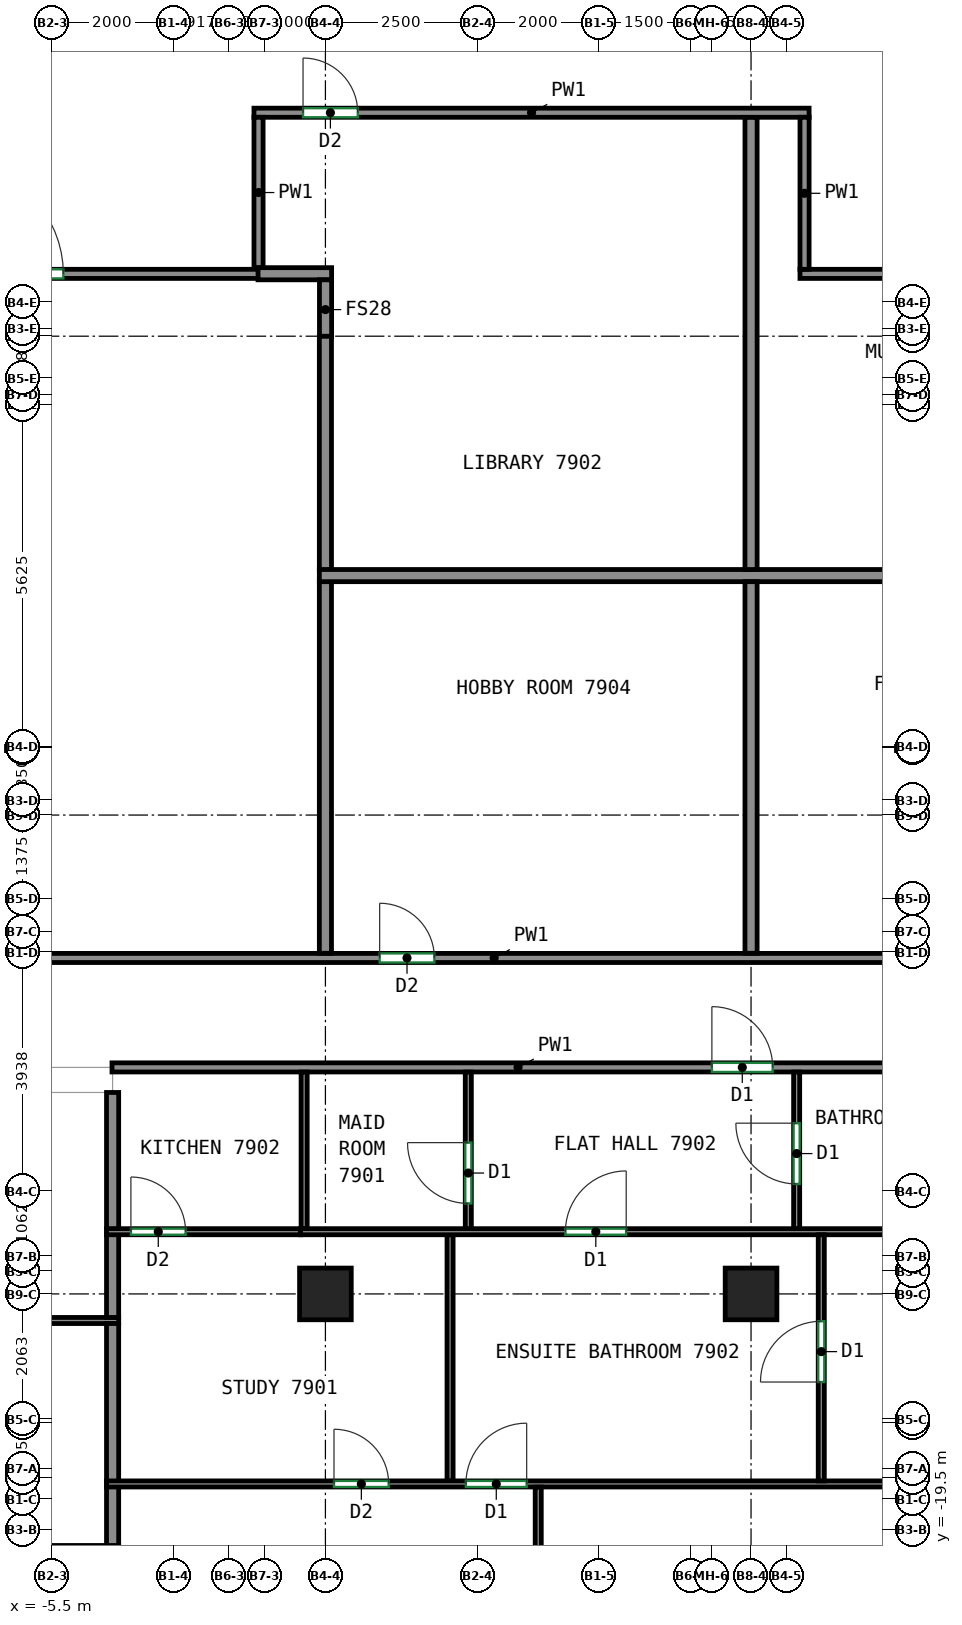
"""IFC4 building model, lengths in metres.
Left out: names, types, materials, properties, quantities, classifications, styles, units other than length and angle.
Written with IfcOpenShell. Run it as: python <this file> out.ifc"""

import sys

from ifc_helpers import new_model, si_unit, direction, frame, frame_2d, origin, origin_2d, place, context, subcontext, project, spatial, rectangle, extrude, source, transform, mapped, element, fill, save


model = new_model("IFC4")
c1 = context("Model", 3, precision=1e-05, world=origin(), true_north=direction((0.0, 1.0)))
c2 = subcontext(c1, "Body", "Model", "MODEL_VIEW")
j1 = project(units=[si_unit("LENGTHUNIT", "METRE"), si_unit("PLANEANGLEUNIT", "RADIAN")], contexts=[c1])
p1 = place(None, origin())
s1 = spatial("IfcSite", under=j1, at=p1, CompositionType="ELEMENT")
p2 = place(p1, origin())
s2 = spatial("IfcBuilding", under=s1, at=p2, CompositionType="ELEMENT")
p3 = place(p2, frame((0.0, 0.0, 315.4)))
s3 = spatial("IfcBuildingStorey", under=s2, at=p3, CompositionType="ELEMENT", Elevation=315.4)
m1 = source(origin(), c2, "Body", "SweptSolid", [
    extrude(rectangle(XDim=0.85, YDim=0.85, at=origin_2d()), origin(), (0.0, 0.0, 1.0), 3.0),
])
for number, where, z_axis, x_axis in (
    (1, (-1.0, -15.625, 0.0), (0.0, 0.0, 1.0), (1.0, 0.0, 0.0)),
    (2, (6.0, -15.625, 0.0), (0.0, 0.0, 1.0), (1.0, 0.0, 0.0)),
):
    element("IfcColumn", number, at=place(p3, frame(where, z_axis=z_axis, x_axis=x_axis)), inside=s3, PredefinedType="COLUMN", context=c2, shape_type="MappedRepresentation", body=[
        mapped(m1, transform((0.0, 0.0, 0.0))),
    ])
p4 = place(p3, frame((-4.51, -11.9, 0.0), z_axis=(0.0, 0.0, 1.0), x_axis=(1.0, 0.0, 0.0)))
e3 = element("IfcWall", 3, at=p4, inside=s3, PredefinedType="PARTITIONING", context=c2, shape_type="SweptSolid", body=[
    extrude(rectangle(XDim=22.26, YDim=0.15, at=frame_2d((11.13, 0.0))), origin(), (0.0, 0.0, 1.0), 3.0),
])
p5 = place(p4, frame((9.866, 0.0, 0.0)))
e4 = element("IfcOpeningElement", 4, at=p5, cuts=e3, PredefinedType="OPENING", context=c2, shape_type="SweptSolid", body=[
    extrude(rectangle(XDim=1.0, YDim=2.1, at=frame_2d((0.5, 1.05))), frame((0.0, 0.085, 0.0), z_axis=(0.0, -1.0, 0.0), x_axis=(1.0, 0.0, 0.0)), (0.0, 0.0, 1.0), 0.17),
])
p6 = place(p3, frame((-14.935, 1.15, 0.0), z_axis=(0.0, 0.0, 1.0), x_axis=(1.0, 0.0, 0.0)))
e5 = element("IfcWall", 5, at=p6, inside=s3, PredefinedType="PARTITIONING", context=c2, shape_type="SweptSolid", body=[
    extrude(rectangle(XDim=12.835, YDim=0.15, at=frame_2d((6.417, 0.0))), origin(), (0.0, 0.0, 1.0), 3.0),
])
p7 = place(p6, frame((7.825, 0.0, 0.0)))
e6 = element("IfcOpeningElement", 6, at=p7, cuts=e5, PredefinedType="OPENING", context=c2, shape_type="SweptSolid", body=[
    extrude(rectangle(XDim=1.8, YDim=2.1, at=frame_2d((0.9, 1.05))), frame((0.0, 0.085, 0.0), z_axis=(0.0, -1.0, 0.0), x_axis=(1.0, 0.0, 0.0)), (0.0, 0.0, 1.0), 0.17),
])
p8 = place(p3, frame((-13.55, -10.1, 0.0), z_axis=(0.0, 0.0, 1.0), x_axis=(1.0, 0.0, 0.0)))
e7 = element("IfcWall", 7, at=p8, inside=s3, PredefinedType="PARTITIONING", context=c2, shape_type="SweptSolid", body=[
    extrude(rectangle(XDim=30.65, YDim=0.15, at=frame_2d((15.325, 0.0))), origin(), (0.0, 0.0, 1.0), 3.0),
])
p9 = place(p8, frame((13.442, 0.0, 0.0)))
e8 = element("IfcOpeningElement", 8, at=p9, cuts=e7, PredefinedType="OPENING", context=c2, shape_type="SweptSolid", body=[
    extrude(rectangle(XDim=0.9, YDim=2.1, at=frame_2d((0.45, 1.05))), frame((0.0, 0.085, 0.0), z_axis=(0.0, -1.0, 0.0), x_axis=(1.0, 0.0, 0.0)), (0.0, 0.0, 1.0), 0.17),
])
p10 = place(p8, frame((25.452, 0.0, 0.0)))
e9 = element("IfcOpeningElement", 9, at=p10, cuts=e7, PredefinedType="OPENING", context=c2, shape_type="SweptSolid", body=[
    extrude(rectangle(XDim=0.9, YDim=2.1, at=frame_2d((0.45, 1.05))), frame((0.0, 0.085, 0.0), z_axis=(0.0, -1.0, 0.0), x_axis=(1.0, 0.0, 0.0)), (0.0, 0.0, 1.0), 0.17),
])
p11 = place(p3, frame((-2.175, 3.8, 0.0), z_axis=(0.0, 0.0, 1.0), x_axis=(1.0, 0.0, 0.0)))
e10 = element("IfcWall", 10, at=p11, inside=s3, PredefinedType="PARTITIONING", context=c2, shape_type="SweptSolid", body=[
    extrude(rectangle(XDim=9.13, YDim=0.15, at=frame_2d((4.565, 0.0))), origin(), (0.0, 0.0, 1.0), 3.0),
])
p12 = place(p11, frame((0.807, 0.0, 0.0)))
e11 = element("IfcOpeningElement", 11, at=p12, cuts=e10, PredefinedType="OPENING", context=c2, shape_type="SweptSolid", body=[
    extrude(rectangle(XDim=0.9, YDim=2.1, at=frame_2d((0.45, 1.05))), frame((0.0, 0.085, 0.0), z_axis=(0.0, -1.0, 0.0), x_axis=(1.0, 0.0, 0.0)), (0.0, 0.0, 1.0), 0.17),
])
p13 = place(p3, frame((-2.1, 1.25, 0.0), z_axis=(0.0, 0.0, 1.0), x_axis=(0.0, 1.0, 0.0)))
e12 = element("IfcWall", 12, at=p13, inside=s3, PredefinedType="PARTITIONING", context=c2, shape_type="SweptSolid", body=[
    extrude(rectangle(XDim=2.475, YDim=0.15, at=frame_2d((1.238, 0.0))), origin(), (0.0, 0.0, 1.0), 3.0),
])
p14 = place(p3, frame((6.805, 1.15, 0.0), z_axis=(0.0, 0.0, 1.0), x_axis=(1.0, 0.0, 0.0)))
e13 = element("IfcWall", 13, at=p14, inside=s3, PredefinedType="PARTITIONING", context=c2, shape_type="SweptSolid", body=[
    extrude(rectangle(XDim=10.55, YDim=0.15, at=frame_2d((5.275, 0.0))), origin(), (0.0, 0.0, 1.0), 3.0),
])
p15 = place(p14, frame((6.704, 0.0, 0.0)))
e14 = element("IfcOpeningElement", 14, at=p15, cuts=e13, PredefinedType="OPENING", context=c2, shape_type="SweptSolid", body=[
    extrude(rectangle(XDim=0.9, YDim=2.1, at=frame_2d((0.45, 1.05))), frame((0.0, 0.085, 0.0), z_axis=(0.0, -1.0, 0.0), x_axis=(1.0, 0.0, 0.0)), (0.0, 0.0, 1.0), 0.17),
])
p16 = place(p3, frame((6.88, 3.725, 0.0), z_axis=(0.0, 0.0, 1.0), x_axis=(0.0, -1.0, 0.0)))
e15 = element("IfcWall", 15, at=p16, inside=s3, PredefinedType="PARTITIONING", context=c2, shape_type="SweptSolid", body=[
    extrude(rectangle(XDim=2.5, YDim=0.15, at=frame_2d((1.25, 0.0))), origin(), (0.0, 0.0, 1.0), 3.0),
])
p17 = place(p3, frame((-7.575, -16.062, 0.0), z_axis=(0.0, 0.0, 1.0), x_axis=(1.0, 0.0, 0.0)))
e16 = element("IfcWall", 16, at=p17, inside=s3, PredefinedType="PARTITIONING", context=c2, shape_type="SweptSolid", body=[
    extrude(rectangle(XDim=3.175, YDim=0.1, at=frame_2d((1.587, 0.0))), origin(), (0.0, 0.0, 1.0), 3.0),
])
p18 = place(p3, frame((-4.5, -18.71, 0.0), z_axis=(0.0, 0.0, 1.0), x_axis=(0.0, 1.0, 0.0)))
e17 = element("IfcWall", 17, at=p18, inside=s3, PredefinedType="PARTITIONING", context=c2, shape_type="SweptSolid", body=[
    extrude(rectangle(XDim=2.598, YDim=0.2, at=frame_2d((1.299, 0.0))), origin(), (0.0, 0.0, 1.0), 3.0),
])
p19 = place(p3, frame((-4.5, -19.762, 0.0), z_axis=(0.0, 0.0, 1.0), x_axis=(0.0, 1.0, 0.0)))
e18 = element("IfcWall", 18, at=p19, inside=s3, PredefinedType="PARTITIONING", context=c2, shape_type="SweptSolid", body=[
    extrude(rectangle(XDim=0.97, YDim=0.2, at=frame_2d((0.485, 0.0))), origin(), (0.0, 0.0, 1.0), 3.0),
])
p20 = place(p3, frame((-4.5, -16.012, 0.0), z_axis=(0.0, 0.0, 1.0), x_axis=(0.0, 1.0, 0.0)))
e19 = element("IfcWall", 19, at=p20, inside=s3, PredefinedType="PARTITIONING", context=c2, shape_type="SweptSolid", body=[
    extrude(rectangle(XDim=1.37, YDim=0.2, at=frame_2d((0.685, 0.0))), origin(), (0.0, 0.0, 1.0), 3.0),
])
p21 = place(p3, frame((-4.5, -14.56, 0.0), z_axis=(0.0, 0.0, 1.0), x_axis=(0.0, 1.0, 0.0)))
e20 = element("IfcWall", 20, at=p21, inside=s3, PredefinedType="PARTITIONING", context=c2, shape_type="SweptSolid", body=[
    extrude(rectangle(XDim=2.248, YDim=0.2, at=frame_2d((1.124, 0.0))), origin(), (0.0, 0.0, 1.0), 3.0),
])
p22 = place(p3, frame((1.05, -18.7, 0.0), z_axis=(0.0, 0.0, 1.0), x_axis=(0.0, 1.0, 0.0)))
e21 = element("IfcWall", 21, at=p22, inside=s3, PredefinedType="PARTITIONING", context=c2, shape_type="SweptSolid", body=[
    extrude(rectangle(XDim=4.048, YDim=0.1, at=frame_2d((2.024, 0.0))), origin(), (0.0, 0.0, 1.0), 3.0),
])
p23 = place(p3, frame((-4.6, -14.602, 0.0), z_axis=(0.0, 0.0, 1.0), x_axis=(1.0, 0.0, 0.0)))
e22 = element("IfcWall", 22, at=p23, inside=s3, PredefinedType="PARTITIONING", context=c2, shape_type="SweptSolid", body=[
    extrude(rectangle(XDim=3.19, YDim=0.1, at=frame_2d((1.595, 0.0))), origin(), (0.0, 0.0, 1.0), 3.0),
])
p24 = place(p23, frame((0.401, 0.0, 0.0)))
e23 = element("IfcOpeningElement", 23, at=p24, cuts=e22, PredefinedType="OPENING", context=c2, shape_type="SweptSolid", body=[
    extrude(rectangle(XDim=0.9, YDim=2.1, at=frame_2d((0.45, 1.05))), frame((0.0, 0.06, 0.0), z_axis=(0.0, -1.0, 0.0), x_axis=(1.0, 0.0, 0.0)), (0.0, 0.0, 1.0), 0.12),
])
p25 = place(p3, frame((-1.41, -14.602, 0.0), z_axis=(0.0, 0.0, 1.0), x_axis=(1.0, 0.0, 0.0)))
e24 = element("IfcWall", 24, at=p25, inside=s3, PredefinedType="PARTITIONING", context=c2, shape_type="SweptSolid", body=[
    extrude(rectangle(XDim=19.16, YDim=0.1, at=frame_2d((9.58, 0.0))), origin(), (0.0, 0.0, 1.0), 3.0),
])
p26 = place(p25, frame((4.357, 0.0, 0.0)))
e25 = element("IfcOpeningElement", 25, at=p26, cuts=e24, PredefinedType="OPENING", context=c2, shape_type="SweptSolid", body=[
    extrude(rectangle(XDim=1.0, YDim=2.1, at=frame_2d((0.5, 1.05))), frame((0.0, 0.06, 0.0), z_axis=(0.0, -1.0, 0.0), x_axis=(1.0, 0.0, 0.0)), (0.0, 0.0, 1.0), 0.12),
])
p27 = place(p25, frame((11.804, 0.0, 0.0)))
e26 = element("IfcOpeningElement", 26, at=p27, cuts=e24, PredefinedType="OPENING", context=c2, shape_type="SweptSolid", body=[
    extrude(rectangle(XDim=0.9, YDim=2.1, at=frame_2d((0.45, 1.05))), frame((0.0, 0.06, 0.0), z_axis=(0.0, -1.0, 0.0), x_axis=(1.0, 0.0, 0.0)), (0.0, 0.0, 1.0), 0.12),
])
p28 = place(p25, frame((14.91, 0.0, 0.0)))
e27 = element("IfcOpeningElement", 27, at=p28, cuts=e24, PredefinedType="OPENING", context=c2, shape_type="SweptSolid", body=[
    extrude(rectangle(XDim=0.9, YDim=2.1, at=frame_2d((0.45, 1.05))), frame((0.0, 0.06, 0.0), z_axis=(0.0, -1.0, 0.0), x_axis=(1.0, 0.0, 0.0)), (0.0, 0.0, 1.0), 0.12),
])
p29 = place(p3, frame((-4.6, -18.75, 0.0), z_axis=(0.0, 0.0, 1.0), x_axis=(1.0, 0.0, 0.0)))
e28 = element("IfcWall", 28, at=p29, inside=s3, PredefinedType="PARTITIONING", context=c2, shape_type="SweptSolid", body=[
    extrude(rectangle(XDim=27.85, YDim=0.1, at=frame_2d((13.925, 0.0))), origin(), (0.0, 0.0, 1.0), 3.0),
])
p30 = place(p29, frame((3.741, 0.0, 0.0)))
e29 = element("IfcOpeningElement", 29, at=p30, cuts=e28, PredefinedType="OPENING", context=c2, shape_type="SweptSolid", body=[
    extrude(rectangle(XDim=0.9, YDim=2.1, at=frame_2d((0.45, 1.05))), frame((0.0, 0.06, 0.0), z_axis=(0.0, -1.0, 0.0), x_axis=(1.0, 0.0, 0.0)), (0.0, 0.0, 1.0), 0.12),
])
p31 = place(p29, frame((5.91, 0.0, 0.0)))
e30 = element("IfcOpeningElement", 30, at=p31, cuts=e28, PredefinedType="OPENING", context=c2, shape_type="SweptSolid", body=[
    extrude(rectangle(XDim=1.0, YDim=2.1, at=frame_2d((0.5, 1.05))), frame((0.0, 0.06, 0.0), z_axis=(0.0, -1.0, 0.0), x_axis=(1.0, 0.0, 0.0)), (0.0, 0.0, 1.0), 0.12),
])
p32 = place(p3, frame((7.155, -18.7, 0.0), z_axis=(0.0, 0.0, 1.0), x_axis=(0.0, 1.0, 0.0)))
e31 = element("IfcWall", 31, at=p32, inside=s3, PredefinedType="PARTITIONING", context=c2, shape_type="SweptSolid", body=[
    extrude(rectangle(XDim=4.048, YDim=0.1, at=frame_2d((2.024, 0.0))), origin(), (0.0, 0.0, 1.0), 3.0),
])
p33 = place(p32, frame((1.626, 0.0, 0.0)))
e32 = element("IfcOpeningElement", 32, at=p33, cuts=e31, PredefinedType="OPENING", context=c2, shape_type="SweptSolid", body=[
    extrude(rectangle(XDim=1.0, YDim=2.1, at=frame_2d((0.5, 1.05))), frame((0.0, 0.06, 0.0), z_axis=(0.0, -1.0, 0.0), x_axis=(1.0, 0.0, 0.0)), (0.0, 0.0, 1.0), 0.12),
])
p34 = place(p3, frame((-1.35, -14.55, 0.0), z_axis=(0.0, 0.0, 1.0), x_axis=(0.0, 1.0, 0.0)))
e33 = element("IfcWall", 33, at=p34, inside=s3, PredefinedType="PARTITIONING", context=c2, shape_type="SweptSolid", body=[
    extrude(rectangle(XDim=2.573, YDim=0.1, at=frame_2d((1.287, 0.0))), origin(), (0.0, 0.0, 1.0), 3.0),
])
p35 = place(p3, frame((1.35, -14.55, 0.0), z_axis=(0.0, 0.0, 1.0), x_axis=(0.0, 1.0, 0.0)))
e34 = element("IfcWall", 34, at=p35, inside=s3, PredefinedType="PARTITIONING", context=c2, shape_type="SweptSolid", body=[
    extrude(rectangle(XDim=2.573, YDim=0.1, at=frame_2d((1.287, 0.0))), origin(), (0.0, 0.0, 1.0), 3.0),
])
p36 = place(p35, frame((0.413, 0.0, 0.0)))
e35 = element("IfcOpeningElement", 35, at=p36, cuts=e34, PredefinedType="OPENING", context=c2, shape_type="SweptSolid", body=[
    extrude(rectangle(XDim=1.0, YDim=2.1, at=frame_2d((0.5, 1.05))), frame((0.0, 0.06, 0.0), z_axis=(0.0, -1.0, 0.0), x_axis=(1.0, 0.0, 0.0)), (0.0, 0.0, 1.0), 0.12),
])
p37 = place(p3, frame((6.75, -14.55, 0.0), z_axis=(0.0, 0.0, 1.0), x_axis=(0.0, 1.0, 0.0)))
e36 = element("IfcWall", 36, at=p37, inside=s3, PredefinedType="PARTITIONING", context=c2, shape_type="SweptSolid", body=[
    extrude(rectangle(XDim=2.573, YDim=0.1, at=frame_2d((1.287, 0.0))), origin(), (0.0, 0.0, 1.0), 3.0),
])
p38 = place(p37, frame((0.733, 0.0, 0.0)))
e37 = element("IfcOpeningElement", 37, at=p38, cuts=e36, PredefinedType="OPENING", context=c2, shape_type="SweptSolid", body=[
    extrude(rectangle(XDim=1.0, YDim=2.1, at=frame_2d((0.5, 1.05))), frame((0.0, 0.06, 0.0), z_axis=(0.0, -1.0, 0.0), x_axis=(1.0, 0.0, 0.0)), (0.0, 0.0, 1.0), 0.12),
])
p39 = place(p3, frame((2.5, -23.25, 0.0), z_axis=(0.0, 0.0, 1.0), x_axis=(0.0, 1.0, 0.0)))
e38 = element("IfcWall", 38, at=p39, inside=s3, PredefinedType="PARTITIONING", context=c2, shape_type="SweptSolid", body=[
    extrude(rectangle(XDim=4.448, YDim=0.1, at=frame_2d((2.224, 0.0))), origin(), (0.0, 0.0, 1.0), 3.0),
])
p40 = place(p39, frame((2.028, 0.0, 0.0)))
e39 = element("IfcOpeningElement", 39, at=p40, cuts=e38, PredefinedType="OPENING", context=c2, shape_type="SweptSolid", body=[
    extrude(rectangle(XDim=0.9, YDim=2.1, at=frame_2d((0.45, 1.05))), frame((0.0, 0.06, 0.0), z_axis=(0.0, -1.0, 0.0), x_axis=(1.0, 0.0, 0.0)), (0.0, 0.0, 1.0), 0.12),
])
p41 = place(p3, frame((-0.898, 1.152, 0.0), z_axis=(0.0, 0.0, 1.0), x_axis=(-1.0, 0.0, 0.0)))
e40 = element("IfcWall", 40, at=p41, inside=s3, PredefinedType="PARTITIONING", context=c2, shape_type="SweptSolid", body=[
    extrude(rectangle(XDim=1.21, YDim=0.2, at=frame_2d((0.605, 0.0))), origin(), (0.0, 0.0, 1.0), 3.0),
])
p42 = place(p3, frame((-0.998, 0.123, 0.0), z_axis=(0.0, 0.0, 1.0), x_axis=(0.0, 1.0, 0.0)))
e41 = element("IfcWall", 41, at=p42, inside=s3, PredefinedType="PARTITIONING", context=c2, shape_type="SweptSolid", body=[
    extrude(rectangle(XDim=0.929, YDim=0.2, at=frame_2d((0.464, 0.0))), origin(), (0.0, 0.0, 1.0), 3.0),
])
p43 = place(p3, frame((-1.0, -3.722, 0.0), z_axis=(0.0, 0.0, 1.0), x_axis=(0.0, 1.0, 0.0)))
e42 = element("IfcWall", 42, at=p43, inside=s3, PredefinedType="PARTITIONING", context=c2, shape_type="SweptSolid", body=[
    extrude(rectangle(XDim=3.845, YDim=0.2, at=frame_2d((1.922, 0.0))), origin(), (0.0, 0.0, 1.0), 3.0),
])
p44 = place(p3, frame((-1.0, -10.023, 0.0), z_axis=(0.0, 0.0, 1.0), x_axis=(0.0, 1.0, 0.0)))
e43 = element("IfcWall", 43, at=p44, inside=s3, PredefinedType="PARTITIONING", context=c2, shape_type="SweptSolid", body=[
    extrude(rectangle(XDim=6.121, YDim=0.2, at=frame_2d((3.061, 0.0))), origin(), (0.0, 0.0, 1.0), 3.0),
])
p45 = place(p3, frame((-1.1, -3.812, 0.0), z_axis=(0.0, 0.0, 1.0), x_axis=(1.0, 0.0, 0.0)))
e44 = element("IfcWall", 44, at=p45, inside=s3, PredefinedType="PARTITIONING", context=c2, shape_type="SweptSolid", body=[
    extrude(rectangle(XDim=14.2, YDim=0.2, at=frame_2d((7.1, 0.0))), origin(), (0.0, 0.0, 1.0), 3.0),
])
p46 = place(p3, frame((6.0, -3.712, 0.0), z_axis=(0.0, 0.0, 1.0), x_axis=(0.0, 1.0, 0.0)))
e45 = element("IfcWall", 45, at=p46, inside=s3, PredefinedType="PARTITIONING", context=c2, shape_type="SweptSolid", body=[
    extrude(rectangle(XDim=7.435, YDim=0.2, at=frame_2d((3.717, 0.0))), origin(), (0.0, 0.0, 1.0), 3.0),
])
p47 = place(p3, frame((6.0, -10.023, 0.0), z_axis=(0.0, 0.0, 1.0), x_axis=(0.0, 1.0, 0.0)))
e46 = element("IfcWall", 46, at=p47, inside=s3, PredefinedType="PARTITIONING", context=c2, shape_type="SweptSolid", body=[
    extrude(rectangle(XDim=6.111, YDim=0.2, at=frame_2d((3.055, 0.0))), origin(), (0.0, 0.0, 1.0), 3.0),
])
p48 = place(p30, origin())
e47 = element("IfcDoor", 47, at=p48, inside=s3, OperationType="SINGLE_SWING_LEFT", PredefinedType="DOOR", context=c2, shape_type="SweptSolid", body=[
    extrude(rectangle(XDim=0.9, YDim=2.1, at=frame_2d((0.45, 1.05))), frame((0.0, 0.025, 0.0), z_axis=(0.0, -1.0, 0.0), x_axis=(1.0, 0.0, 0.0)), (0.0, 0.0, 1.0), 0.05),
])
fill(e29, e47)
p49 = place(p31, origin())
e48 = element("IfcDoor", 48, at=p49, inside=s3, OperationType="SINGLE_SWING_RIGHT", PredefinedType="DOOR", context=c2, shape_type="SweptSolid", body=[
    extrude(rectangle(XDim=1.0, YDim=2.1, at=frame_2d((0.5, 1.05))), frame((0.0, 0.025, 0.0), z_axis=(0.0, -1.0, 0.0), x_axis=(1.0, 0.0, 0.0)), (0.0, 0.0, 1.0), 0.05),
])
fill(e30, e48)
p50 = place(p33, origin())
e49 = element("IfcDoor", 49, at=p50, inside=s3, OperationType="SINGLE_SWING_LEFT", PredefinedType="DOOR", context=c2, shape_type="SweptSolid", body=[
    extrude(rectangle(XDim=1.0, YDim=2.1, at=frame_2d((0.5, 1.05))), frame((0.0, 0.025, 0.0), z_axis=(0.0, -1.0, 0.0), x_axis=(1.0, 0.0, 0.0)), (0.0, 0.0, 1.0), 0.05),
])
fill(e32, e49)
p51 = place(p24, origin())
e50 = element("IfcDoor", 50, at=p51, inside=s3, OperationType="SINGLE_SWING_LEFT", PredefinedType="DOOR", context=c2, shape_type="SweptSolid", body=[
    extrude(rectangle(XDim=0.9, YDim=2.1, at=frame_2d((0.45, 1.05))), frame((0.0, 0.025, 0.0), z_axis=(0.0, -1.0, 0.0), x_axis=(1.0, 0.0, 0.0)), (0.0, 0.0, 1.0), 0.05),
])
fill(e23, e50)
p52 = place(p26, origin())
e51 = element("IfcDoor", 51, at=p52, inside=s3, OperationType="SINGLE_SWING_RIGHT", PredefinedType="DOOR", context=c2, shape_type="SweptSolid", body=[
    extrude(rectangle(XDim=1.0, YDim=2.1, at=frame_2d((0.5, 1.05))), frame((0.0, 0.025, 0.0), z_axis=(0.0, -1.0, 0.0), x_axis=(1.0, 0.0, 0.0)), (0.0, 0.0, 1.0), 0.05),
])
fill(e25, e51)
p53 = place(p36, origin())
e52 = element("IfcDoor", 52, at=p53, inside=s3, OperationType="SINGLE_SWING_RIGHT", PredefinedType="DOOR", context=c2, shape_type="SweptSolid", body=[
    extrude(rectangle(XDim=1.0, YDim=2.1, at=frame_2d((0.5, 1.05))), frame((0.0, 0.025, 0.0), z_axis=(0.0, -1.0, 0.0), x_axis=(1.0, 0.0, 0.0)), (0.0, 0.0, 1.0), 0.05),
])
fill(e35, e52)
p54 = place(p38, origin())
e53 = element("IfcDoor", 53, at=p54, inside=s3, OperationType="SINGLE_SWING_RIGHT", PredefinedType="DOOR", context=c2, shape_type="SweptSolid", body=[
    extrude(rectangle(XDim=1.0, YDim=2.1, at=frame_2d((0.5, 1.05))), frame((0.0, 0.025, 0.0), z_axis=(0.0, -1.0, 0.0), x_axis=(1.0, 0.0, 0.0)), (0.0, 0.0, 1.0), 0.05),
])
fill(e37, e53)
p55 = place(p5, origin())
e54 = element("IfcDoor", 54, at=p55, inside=s3, OperationType="SINGLE_SWING_LEFT", PredefinedType="DOOR", context=c2, shape_type="SweptSolid", body=[
    extrude(rectangle(XDim=1.0, YDim=2.1, at=frame_2d((0.5, 1.05))), frame((0.0, 0.025, 0.0), z_axis=(0.0, -1.0, 0.0), x_axis=(1.0, 0.0, 0.0)), (0.0, 0.0, 1.0), 0.05),
])
fill(e4, e54)
p56 = place(p9, origin())
e55 = element("IfcDoor", 55, at=p56, inside=s3, OperationType="SINGLE_SWING_LEFT", PredefinedType="DOOR", context=c2, shape_type="SweptSolid", body=[
    extrude(rectangle(XDim=0.9, YDim=2.1, at=frame_2d((0.45, 1.05))), frame((0.0, 0.025, 0.0), z_axis=(0.0, -1.0, 0.0), x_axis=(1.0, 0.0, 0.0)), (0.0, 0.0, 1.0), 0.05),
])
fill(e8, e55)
p57 = place(p7, origin())
e56 = element("IfcDoor", 56, at=p57, inside=s3, OperationType="DOUBLE_DOOR_SINGLE_SWING", PredefinedType="DOOR", context=c2, shape_type="SweptSolid", body=[
    extrude(rectangle(XDim=1.8, YDim=2.1, at=frame_2d((0.9, 1.05))), frame((0.0, 0.025, 0.0), z_axis=(0.0, -1.0, 0.0), x_axis=(1.0, 0.0, 0.0)), (0.0, 0.0, 1.0), 0.05),
])
fill(e6, e56)
p58 = place(p12, origin())
e57 = element("IfcDoor", 57, at=p58, inside=s3, OperationType="SINGLE_SWING_LEFT", PredefinedType="DOOR", context=c2, shape_type="SweptSolid", body=[
    extrude(rectangle(XDim=0.9, YDim=2.1, at=frame_2d((0.45, 1.05))), frame((0.0, 0.025, 0.0), z_axis=(0.0, -1.0, 0.0), x_axis=(1.0, 0.0, 0.0)), (0.0, 0.0, 1.0), 0.05),
])
fill(e11, e57)
save(model, sys.argv[1])
